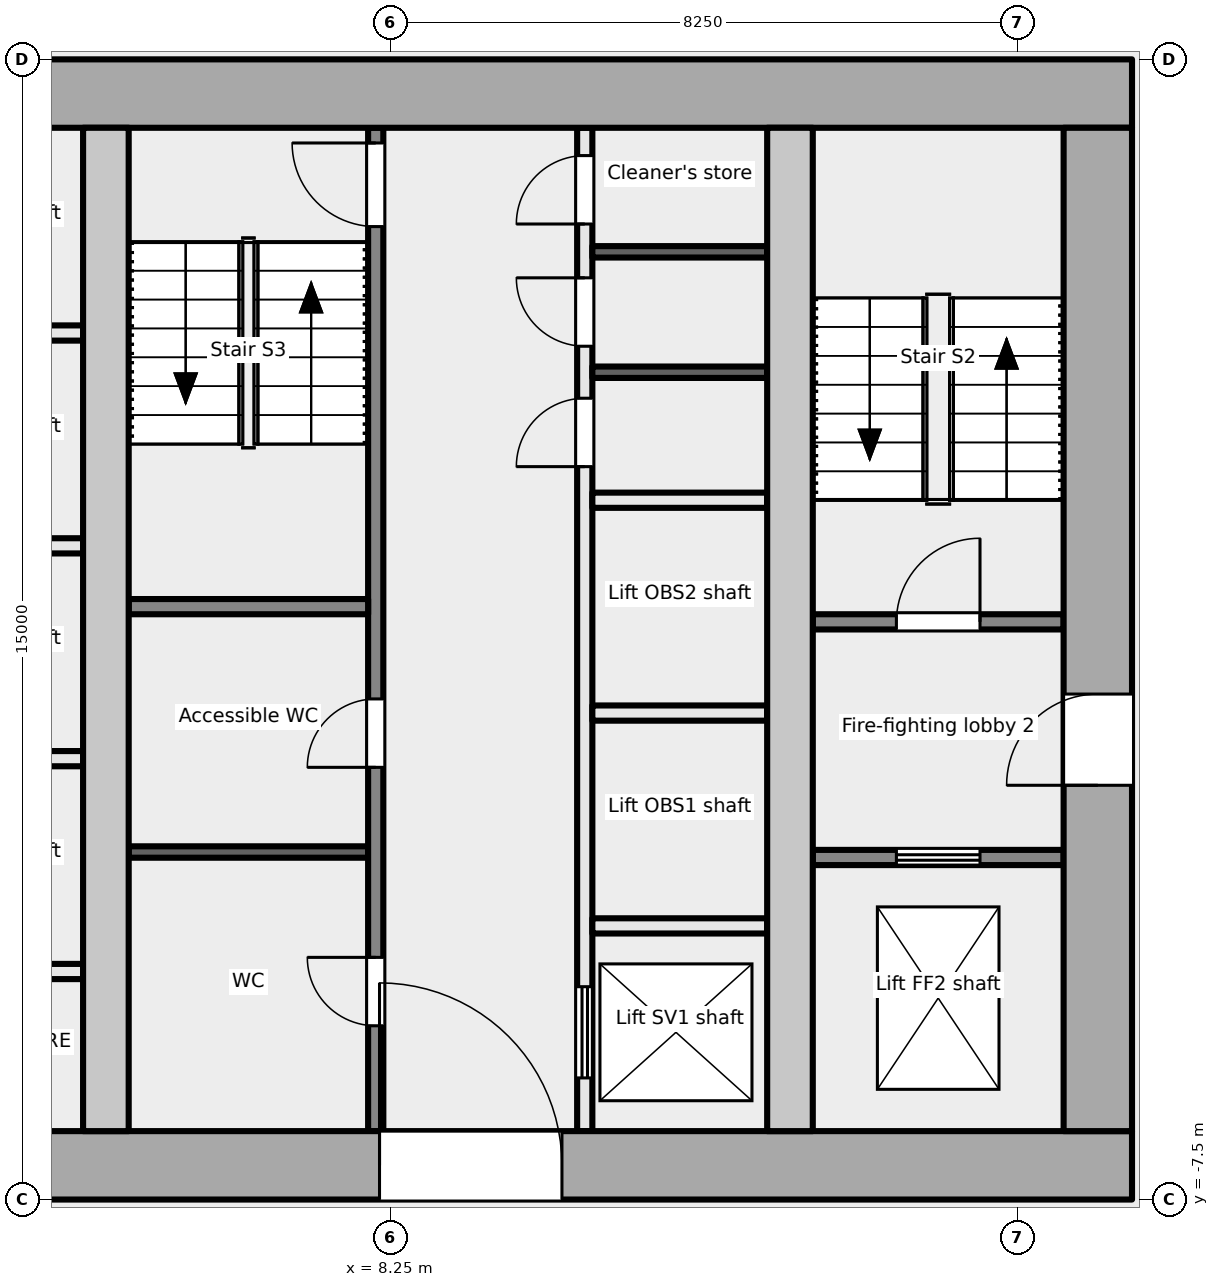
"""IFC4 building model, lengths in metres.
Left out: names, types, materials, properties, quantities, classifications, styles, units other than length and angle.
Written with IfcOpenShell. Run it as: python <this file> out.ifc"""

import sys

from ifc_helpers import new_model, si_unit, direction, frame, frame_2d, origin, place, context, subcontext, project, spatial, rectangle, extrude, element, fill, save


model = new_model("IFC4")
c1 = context("Model", 3, precision=1e-05, world=origin(), true_north=direction((0.0, 1.0)))
c2 = subcontext(c1, "Body", "Model", "MODEL_VIEW")
j1 = project(units=[si_unit("LENGTHUNIT", "METRE"), si_unit("PLANEANGLEUNIT", "RADIAN")], contexts=[c1])
p1 = place(None, origin())
s1 = spatial("IfcSite", under=j1, at=p1, CompositionType="ELEMENT")
p2 = place(p1, origin())
s2 = spatial("IfcBuilding", under=s1, at=p2, CompositionType="ELEMENT")
p3 = place(p2, frame((0.0, 0.0, 74.3)))
s3 = spatial("IfcBuildingStorey", under=s2, at=p3, CompositionType="ELEMENT", Elevation=74.3)
p4 = place(p3, frame((-18.0, -7.05, -0.2), z_axis=(0.0, 0.0, 1.0), x_axis=(1.0, 0.0, 0.0)))
e1 = element("IfcWall", 1, at=p4, inside=s3, PredefinedType="SHEAR", context=c2, shape_type="SweptSolid", body=[
    extrude(rectangle(XDim=36.0, YDim=0.9, at=frame_2d((18.0, 0.0))), origin(), (0.0, 0.0, 1.0), 5.4),
])
p5 = place(p4, frame((7.8, 0.0, 0.2)))
e2 = element("IfcOpeningElement", 2, at=p5, cuts=e1, PredefinedType="OPENING", context=c2, shape_type="SweptSolid", body=[
    extrude(rectangle(XDim=2.4, YDim=2.1, at=frame_2d((1.2, 1.05))), frame((0.0, 0.46, 0.0), z_axis=(0.0, -1.0, 0.0), x_axis=(1.0, 0.0, 0.0)), (0.0, 0.0, 1.0), 0.921),
])
p6 = place(p4, frame((17.4, 0.0, 0.2)))
e3 = element("IfcOpeningElement", 3, at=p6, cuts=e1, PredefinedType="OPENING", context=c2, shape_type="SweptSolid", body=[
    extrude(rectangle(XDim=1.2, YDim=2.1, at=frame_2d((0.6, 1.05))), frame((0.0, 0.46, 0.0), z_axis=(0.0, -1.0, 0.0), x_axis=(1.0, 0.0, 0.0)), (0.0, 0.0, 1.0), 0.921),
])
p7 = place(p4, frame((26.1, 0.0, 0.2)))
e4 = element("IfcOpeningElement", 4, at=p7, cuts=e1, PredefinedType="OPENING", context=c2, shape_type="SweptSolid", body=[
    extrude(rectangle(XDim=2.4, YDim=2.1, at=frame_2d((1.2, 1.05))), frame((0.0, 0.46, 0.0), z_axis=(0.0, -1.0, 0.0), x_axis=(1.0, 0.0, 0.0)), (0.0, 0.0, 1.0), 0.921),
])
p8 = place(p3, frame((-18.0, 7.05, -0.2), z_axis=(0.0, 0.0, 1.0), x_axis=(1.0, 0.0, 0.0)))
e5 = element("IfcWall", 5, at=p8, inside=s3, PredefinedType="SHEAR", context=c2, shape_type="SweptSolid", body=[
    extrude(rectangle(XDim=36.0, YDim=0.9, at=frame_2d((18.0, 0.0))), origin(), (0.0, 0.0, 1.0), 5.4),
])
p9 = place(p3, frame((17.55, -6.6, -0.2), z_axis=(0.0, 0.0, 1.0), x_axis=(0.0, 1.0, 0.0)))
e6 = element("IfcWall", 6, at=p9, inside=s3, PredefinedType="SHEAR", context=c2, shape_type="SweptSolid", body=[
    extrude(rectangle(XDim=13.2, YDim=0.9, at=frame_2d((6.6, 0.0))), origin(), (0.0, 0.0, 1.0), 5.4),
])
p10 = place(p9, frame((4.55, 0.0, 0.2)))
e7 = element("IfcOpeningElement", 7, at=p10, cuts=e6, PredefinedType="OPENING", context=c2, shape_type="SweptSolid", body=[
    extrude(rectangle(XDim=1.2, YDim=2.1, at=frame_2d((0.6, 1.05))), frame((0.0, 0.46, 0.0), z_axis=(0.0, -1.0, 0.0), x_axis=(1.0, 0.0, 0.0)), (0.0, 0.0, 1.0), 0.921),
])
for number, where, z_axis, x_axis in (
    (8, (4.5, -6.6, -0.2), (0.0, 0.0, 1.0), (0.0, 1.0, 0.0)),
    (9, (13.5, -6.6, -0.2), (0.0, 0.0, 1.0), (0.0, 1.0, 0.0)),
):
    element("IfcWall", number, at=place(p3, frame(where, z_axis=z_axis, x_axis=x_axis)), inside=s3, PredefinedType="SHEAR", context=c2, shape_type="SweptSolid", body=[
        extrude(rectangle(XDim=13.2, YDim=0.6, at=frame_2d((6.6, 0.0))), origin(), (0.0, 0.0, 1.0), 5.4),
    ])
p11 = place(p3, frame((13.8, -3.0, 0.0), z_axis=(0.0, 0.0, 1.0), x_axis=(1.0, 0.0, 0.0)))
e10 = element("IfcWall", 10, at=p11, inside=s3, PredefinedType="PARTITIONING", context=c2, shape_type="SweptSolid", body=[
    extrude(rectangle(XDim=3.3, YDim=0.2, at=frame_2d((1.65, 0.0))), origin(), (0.0, 0.0, 1.0), 5.2),
])
p12 = place(p11, frame((1.1, 0.0, 0.0)))
e11 = element("IfcOpeningElement", 11, at=p12, cuts=e10, PredefinedType="OPENING", context=c2, shape_type="SweptSolid", body=[
    extrude(rectangle(XDim=1.1, YDim=2.1, at=frame_2d((0.55, 1.05))), frame((0.0, 0.111, 0.0), z_axis=(0.0, -1.0, 0.0), x_axis=(1.0, 0.0, 0.0)), (0.0, 0.0, 1.0), 0.221),
])
p13 = place(p3, frame((13.8, 0.1, 0.0), z_axis=(0.0, 0.0, 1.0), x_axis=(1.0, 0.0, 0.0)))
e12 = element("IfcWall", 12, at=p13, inside=s3, PredefinedType="PARTITIONING", context=c2, shape_type="SweptSolid", body=[
    extrude(rectangle(XDim=3.3, YDim=0.2, at=frame_2d((1.65, 0.0))), origin(), (0.0, 0.0, 1.0), 5.2),
])
p14 = place(p13, frame((1.1, 0.0, 0.0)))
e13 = element("IfcOpeningElement", 13, at=p14, cuts=e12, PredefinedType="OPENING", context=c2, shape_type="SweptSolid", body=[
    extrude(rectangle(XDim=1.1, YDim=2.1, at=frame_2d((0.55, 1.05))), frame((0.0, 0.111, 0.0), z_axis=(0.0, -1.0, 0.0), x_axis=(1.0, 0.0, 0.0)), (0.0, 0.0, 1.0), 0.221),
])
for number, where, z_axis, x_axis in (
    (14, (1.9, -1.7, 0.0), (0.0, 0.0, 1.0), (1.0, 0.0, 0.0)),
    (15, (1.9, 1.1, 0.0), (0.0, 0.0, 1.0), (1.0, 0.0, 0.0)),
    (16, (1.9, 3.9, 0.0), (0.0, 0.0, 1.0), (1.0, 0.0, 0.0)),
    (17, (1.9, -4.5, 0.0), (0.0, 0.0, 1.0), (1.0, 0.0, 0.0)),
):
    element("IfcWall", number, at=place(p3, frame(where, z_axis=z_axis, x_axis=x_axis)), inside=s3, PredefinedType="PARTITIONING", context=c2, shape_type="SweptSolid", body=[
        extrude(rectangle(XDim=2.3, YDim=0.2, at=frame_2d((1.15, 0.0))), origin(), (0.0, 0.0, 1.0), 5.2),
    ])
p15 = place(p3, frame((8.05, -6.6, 0.0), z_axis=(0.0, 0.0, 1.0), x_axis=(0.0, 1.0, 0.0)))
e18 = element("IfcWall", 18, at=p15, inside=s3, PredefinedType="PARTITIONING", context=c2, shape_type="SweptSolid", body=[
    extrude(rectangle(XDim=13.2, YDim=0.2, at=frame_2d((6.6, 0.0))), origin(), (0.0, 0.0, 1.0), 5.2),
])
p16 = place(p15, frame((1.386, 0.0, 0.0)))
e19 = element("IfcOpeningElement", 19, at=p16, cuts=e18, PredefinedType="OPENING", context=c2, shape_type="SweptSolid", body=[
    extrude(rectangle(XDim=0.9, YDim=2.1, at=frame_2d((0.45, 1.05))), frame((0.0, 0.111, 0.0), z_axis=(0.0, -1.0, 0.0), x_axis=(1.0, 0.0, 0.0)), (0.0, 0.0, 1.0), 0.221),
])
p17 = place(p15, frame((4.786, 0.0, 0.0)))
e20 = element("IfcOpeningElement", 20, at=p17, cuts=e18, PredefinedType="OPENING", context=c2, shape_type="SweptSolid", body=[
    extrude(rectangle(XDim=0.9, YDim=2.1, at=frame_2d((0.45, 1.05))), frame((0.0, 0.111, 0.0), z_axis=(0.0, -1.0, 0.0), x_axis=(1.0, 0.0, 0.0)), (0.0, 0.0, 1.0), 0.221),
])
p18 = place(p15, frame((11.9, 0.0, 0.0)))
e21 = element("IfcOpeningElement", 21, at=p18, cuts=e18, PredefinedType="OPENING", context=c2, shape_type="SweptSolid", body=[
    extrude(rectangle(XDim=1.1, YDim=2.1, at=frame_2d((0.55, 1.05))), frame((0.0, 0.111, 0.0), z_axis=(0.0, -1.0, 0.0), x_axis=(1.0, 0.0, 0.0)), (0.0, 0.0, 1.0), 0.221),
])
p19 = place(p3, frame((10.8, -6.6, 0.0), z_axis=(0.0, 0.0, 1.0), x_axis=(0.0, 1.0, 0.0)))
e22 = element("IfcWall", 22, at=p19, inside=s3, PredefinedType="PARTITIONING", context=c2, shape_type="SweptSolid", body=[
    extrude(rectangle(XDim=13.2, YDim=0.2, at=frame_2d((6.6, 0.0))), origin(), (0.0, 0.0, 1.0), 5.2),
])
p20 = place(p19, frame((0.7, 0.0, 0.0)))
e23 = element("IfcOpeningElement", 23, at=p20, cuts=e22, PredefinedType="OPENING", context=c2, shape_type="SweptSolid", body=[
    extrude(rectangle(XDim=1.2, YDim=2.1, at=frame_2d((0.6, 1.05))), frame((0.0, 0.111, 0.0), z_axis=(0.0, -1.0, 0.0), x_axis=(1.0, 0.0, 0.0)), (0.0, 0.0, 1.0), 0.221),
])
p21 = place(p19, frame((8.742, 0.0, 0.0)))
e24 = element("IfcOpeningElement", 24, at=p21, cuts=e22, PredefinedType="OPENING", context=c2, shape_type="SweptSolid", body=[
    extrude(rectangle(XDim=0.9, YDim=2.1, at=frame_2d((0.45, 1.05))), frame((0.0, 0.111, 0.0), z_axis=(0.0, -1.0, 0.0), x_axis=(1.0, 0.0, 0.0)), (0.0, 0.0, 1.0), 0.221),
])
p22 = place(p19, frame((10.326, 0.0, 0.0)))
e25 = element("IfcOpeningElement", 25, at=p22, cuts=e22, PredefinedType="OPENING", context=c2, shape_type="SweptSolid", body=[
    extrude(rectangle(XDim=0.9, YDim=2.1, at=frame_2d((0.45, 1.05))), frame((0.0, 0.111, 0.0), z_axis=(0.0, -1.0, 0.0), x_axis=(1.0, 0.0, 0.0)), (0.0, 0.0, 1.0), 0.221),
])
p23 = place(p19, frame((11.934, 0.0, 0.0)))
e26 = element("IfcOpeningElement", 26, at=p23, cuts=e22, PredefinedType="OPENING", context=c2, shape_type="SweptSolid", body=[
    extrude(rectangle(XDim=0.9, YDim=2.1, at=frame_2d((0.45, 1.05))), frame((0.0, 0.111, 0.0), z_axis=(0.0, -1.0, 0.0), x_axis=(1.0, 0.0, 0.0)), (0.0, 0.0, 1.0), 0.221),
])
p24 = place(p3, frame((4.8, 0.3, 0.0), z_axis=(0.0, 0.0, 1.0), x_axis=(1.0, 0.0, 0.0)))
e27 = element("IfcWall", 27, at=p24, inside=s3, PredefinedType="PARTITIONING", context=c2, shape_type="SweptSolid", body=[
    extrude(rectangle(XDim=3.15, YDim=0.2, at=frame_2d((1.575, 0.0))), origin(), (0.0, 0.0, 1.0), 5.2),
])
p25 = place(p3, frame((4.8, -2.928, 0.0), z_axis=(0.0, 0.0, 1.0), x_axis=(1.0, 0.0, 0.0)))
e28 = element("IfcWall", 28, at=p25, inside=s3, PredefinedType="PARTITIONING", context=c2, shape_type="SweptSolid", body=[
    extrude(rectangle(XDim=3.15, YDim=0.15, at=frame_2d((1.575, 0.0))), origin(), (0.0, 0.0, 1.0), 5.2),
])
for number, where, z_axis, x_axis in (
    (29, (10.9, -3.9, 0.0), (0.0, 0.0, 1.0), (1.0, 0.0, 0.0)),
    (30, (10.9, -1.1, 0.0), (0.0, 0.0, 1.0), (1.0, 0.0, 0.0)),
    (31, (10.9, 1.7, 0.0), (0.0, 0.0, 1.0), (1.0, 0.0, 0.0)),
):
    element("IfcWall", number, at=place(p3, frame(where, z_axis=z_axis, x_axis=x_axis)), inside=s3, PredefinedType="PARTITIONING", context=c2, shape_type="SweptSolid", body=[
        extrude(rectangle(XDim=2.3, YDim=0.2, at=frame_2d((1.15, 0.0))), origin(), (0.0, 0.0, 1.0), 5.2),
    ])
for number, where, z_axis, x_axis in (
    (32, (10.9, 3.384, 0.0), (0.0, 0.0, 1.0), (1.0, 0.0, 0.0)),
    (33, (10.9, 4.968, 0.0), (0.0, 0.0, 1.0), (1.0, 0.0, 0.0)),
):
    element("IfcWall", number, at=place(p3, frame(where, z_axis=z_axis, x_axis=x_axis)), inside=s3, PredefinedType="PARTITIONING", context=c2, shape_type="SweptSolid", body=[
        extrude(rectangle(XDim=2.3, YDim=0.15, at=frame_2d((1.15, 0.0))), origin(), (0.0, 0.0, 1.0), 5.2),
    ])
p26 = place(p12, origin())
e34 = element("IfcDoor", 34, at=p26, inside=s3, OperationType="DOUBLE_DOOR_SLIDING", PredefinedType="DOOR", context=c2, shape_type="SweptSolid", body=[
    extrude(rectangle(XDim=1.1, YDim=2.1, at=frame_2d((0.55, 1.05))), frame((0.0, 0.025, 0.0), z_axis=(0.0, -1.0, 0.0), x_axis=(1.0, 0.0, 0.0)), (0.0, 0.0, 1.0), 0.05),
])
fill(e11, e34)
p27 = place(p10, origin())
e35 = element("IfcDoor", 35, at=p27, inside=s3, OperationType="SINGLE_SWING_LEFT", PredefinedType="DOOR", context=c2, shape_type="SweptSolid", body=[
    extrude(rectangle(XDim=1.2, YDim=2.1, at=frame_2d((0.6, 1.05))), frame((0.0, 0.025, 0.0), z_axis=(0.0, -1.0, 0.0), x_axis=(1.0, 0.0, 0.0)), (0.0, 0.0, 1.0), 0.05),
])
fill(e7, e35)
p28 = place(p14, origin())
e36 = element("IfcDoor", 36, at=p28, inside=s3, OperationType="SINGLE_SWING_RIGHT", PredefinedType="DOOR", context=c2, shape_type="SweptSolid", body=[
    extrude(rectangle(XDim=1.1, YDim=2.1, at=frame_2d((0.55, 1.05))), frame((0.0, 0.025, 0.0), z_axis=(0.0, -1.0, 0.0), x_axis=(1.0, 0.0, 0.0)), (0.0, 0.0, 1.0), 0.05),
])
fill(e13, e36)
p29 = place(p16, origin())
e37 = element("IfcDoor", 37, at=p29, inside=s3, OperationType="SINGLE_SWING_RIGHT", PredefinedType="DOOR", context=c2, shape_type="SweptSolid", body=[
    extrude(rectangle(XDim=0.9, YDim=2.1, at=frame_2d((0.45, 1.05))), frame((0.0, 0.025, 0.0), z_axis=(0.0, -1.0, 0.0), x_axis=(1.0, 0.0, 0.0)), (0.0, 0.0, 1.0), 0.05),
])
fill(e19, e37)
p30 = place(p17, origin())
e38 = element("IfcDoor", 38, at=p30, inside=s3, OperationType="SINGLE_SWING_LEFT", PredefinedType="DOOR", context=c2, shape_type="SweptSolid", body=[
    extrude(rectangle(XDim=0.9, YDim=2.1, at=frame_2d((0.45, 1.05))), frame((0.0, 0.025, 0.0), z_axis=(0.0, -1.0, 0.0), x_axis=(1.0, 0.0, 0.0)), (0.0, 0.0, 1.0), 0.05),
])
fill(e20, e38)
p31 = place(p18, origin())
e39 = element("IfcDoor", 39, at=p31, inside=s3, OperationType="SINGLE_SWING_RIGHT", PredefinedType="DOOR", context=c2, shape_type="SweptSolid", body=[
    extrude(rectangle(XDim=1.1, YDim=2.1, at=frame_2d((0.55, 1.05))), frame((0.0, 0.025, 0.0), z_axis=(0.0, -1.0, 0.0), x_axis=(1.0, 0.0, 0.0)), (0.0, 0.0, 1.0), 0.05),
])
fill(e21, e39)
p32 = place(p7, origin())
e40 = element("IfcDoor", 40, at=p32, inside=s3, OperationType="DOUBLE_DOOR_DOUBLE_SWING", PredefinedType="DOOR", context=c2, shape_type="SweptSolid", body=[
    extrude(rectangle(XDim=2.4, YDim=2.1, at=frame_2d((1.2, 1.05))), frame((0.0, 0.025, 0.0), z_axis=(0.0, -1.0, 0.0), x_axis=(1.0, 0.0, 0.0)), (0.0, 0.0, 1.0), 0.05),
])
fill(e4, e40)
p33 = place(p20, origin())
e41 = element("IfcDoor", 41, at=p33, inside=s3, OperationType="DOUBLE_DOOR_SLIDING", PredefinedType="DOOR", context=c2, shape_type="SweptSolid", body=[
    extrude(rectangle(XDim=1.2, YDim=2.1, at=frame_2d((0.6, 1.05))), frame((0.0, 0.025, 0.0), z_axis=(0.0, -1.0, 0.0), x_axis=(1.0, 0.0, 0.0)), (0.0, 0.0, 1.0), 0.05),
])
fill(e23, e41)
p34 = place(p21, origin())
e42 = element("IfcDoor", 42, at=p34, inside=s3, OperationType="SINGLE_SWING_LEFT", PredefinedType="DOOR", context=c2, shape_type="SweptSolid", body=[
    extrude(rectangle(XDim=0.9, YDim=2.1, at=frame_2d((0.45, 1.05))), frame((0.0, 0.025, 0.0), z_axis=(0.0, -1.0, 0.0), x_axis=(1.0, 0.0, 0.0)), (0.0, 0.0, 1.0), 0.05),
])
fill(e24, e42)
p35 = place(p22, origin())
e43 = element("IfcDoor", 43, at=p35, inside=s3, OperationType="SINGLE_SWING_RIGHT", PredefinedType="DOOR", context=c2, shape_type="SweptSolid", body=[
    extrude(rectangle(XDim=0.9, YDim=2.1, at=frame_2d((0.45, 1.05))), frame((0.0, 0.025, 0.0), z_axis=(0.0, -1.0, 0.0), x_axis=(1.0, 0.0, 0.0)), (0.0, 0.0, 1.0), 0.05),
])
fill(e25, e43)
p36 = place(p23, origin())
e44 = element("IfcDoor", 44, at=p36, inside=s3, OperationType="SINGLE_SWING_LEFT", PredefinedType="DOOR", context=c2, shape_type="SweptSolid", body=[
    extrude(rectangle(XDim=0.9, YDim=2.1, at=frame_2d((0.45, 1.05))), frame((0.0, 0.025, 0.0), z_axis=(0.0, -1.0, 0.0), x_axis=(1.0, 0.0, 0.0)), (0.0, 0.0, 1.0), 0.05),
])
fill(e26, e44)
save(model, sys.argv[1])
